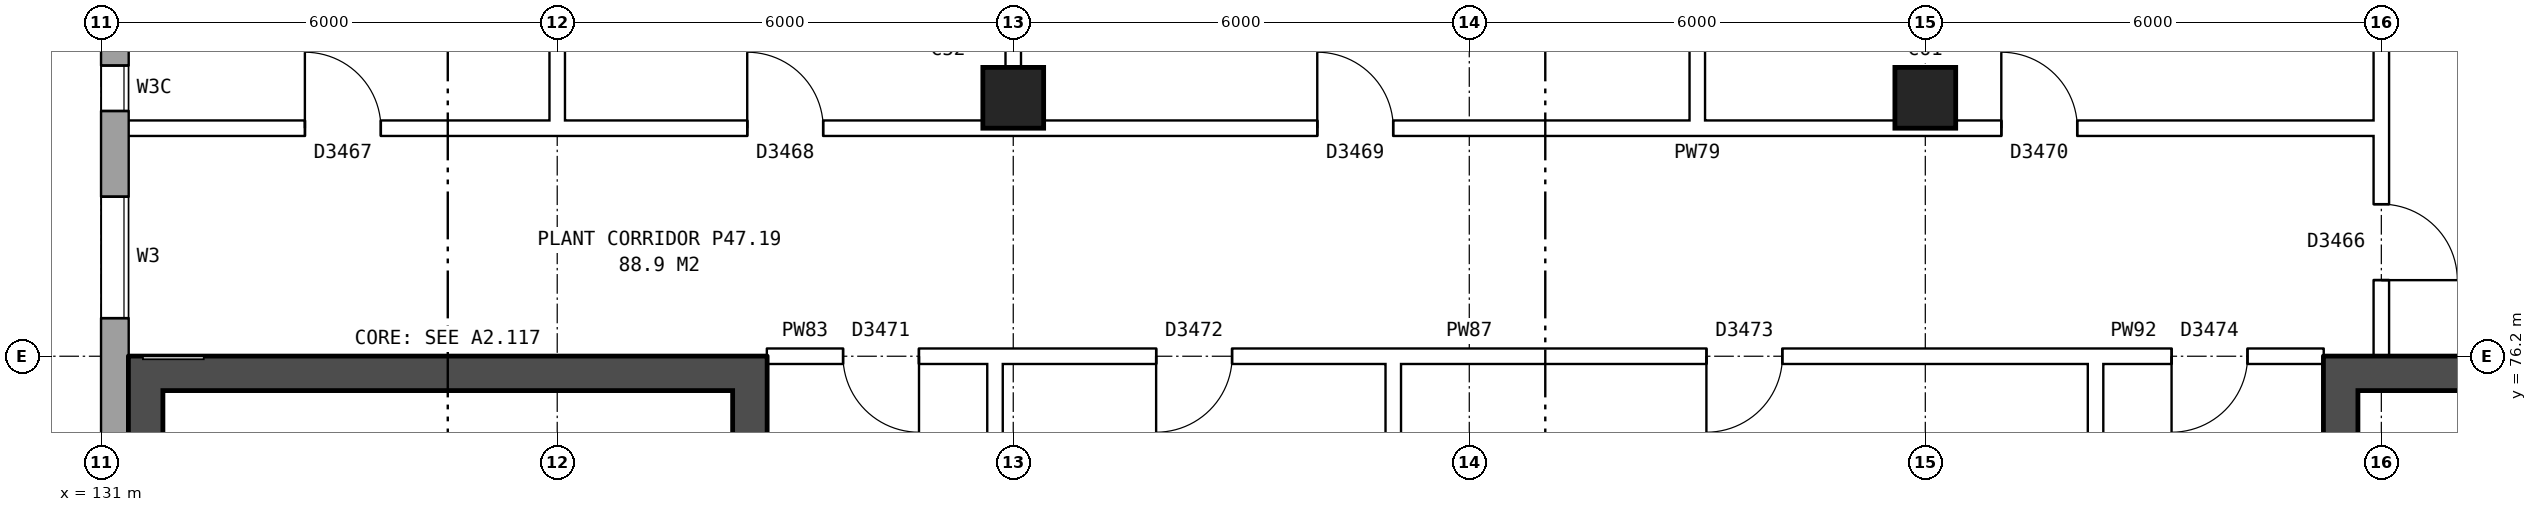
"""IFC4 building model, lengths in metres.
Left out: names, types, materials, properties, quantities, classifications, styles, units other than length and angle.
Written with IfcOpenShell. Run it as: python <this file> out.ifc"""

import sys

from ifc_helpers import new_model, si_unit, direction, frame, frame_2d, origin, origin_2d, place, context, subcontext, project, spatial, rectangle, extrude, element, fill, save


model = new_model("IFC4")
c1 = context("Model", 3, precision=1e-05, world=origin(), true_north=direction((0.0, 1.0)))
c2 = subcontext(c1, "Body", "Model", "MODEL_VIEW")
j1 = project(units=[si_unit("LENGTHUNIT", "METRE"), si_unit("PLANEANGLEUNIT", "RADIAN")], contexts=[c1])
p1 = place(None, origin())
s1 = spatial("IfcSite", under=j1, at=p1, CompositionType="ELEMENT")
p2 = place(p1, origin())
s2 = spatial("IfcBuilding", under=s1, at=p2, CompositionType="ELEMENT")
p3 = place(p2, frame((0.0, 0.0, 167.1)))
s3 = spatial("IfcBuildingStorey", under=s2, at=p3, CompositionType="ELEMENT", Elevation=167.1)
for number, where, z_axis, x_axis in (
    (1, (143.0, 79.6, 0.0), (0.0, 0.0, 1.0), (1.0, 0.0, 0.0)),
    (2, (155.0, 79.6, 0.0), (0.0, 0.0, 1.0), (1.0, 0.0, 0.0)),
):
    element("IfcColumn", number, at=place(p3, frame(where, z_axis=z_axis, x_axis=x_axis)), inside=s3, PredefinedType="COLUMN", context=c2, shape_type="SweptSolid", body=[
        extrude(rectangle(XDim=0.8, YDim=0.8, at=origin_2d()), origin(), (0.0, 0.0, 1.0), 4.2),
    ])
p4 = place(p3, frame((131.18, 82.925, 0.0), z_axis=(0.0, 0.0, 1.0), x_axis=(0.0, -1.0, 0.0)))
e3 = element("IfcWall", 3, at=p4, inside=s3, PredefinedType="STANDARD", context=c2, shape_type="SweptSolid", body=[
    extrude(rectangle(XDim=25.851, YDim=0.36, at=frame_2d((12.925, 0.0))), origin(), (0.0, 0.0, 1.0), 4.2),
])
p5 = place(p4, frame((2.9, 0.0, 1.5)))
e4 = element("IfcOpeningElement", 4, at=p5, cuts=e3, PredefinedType="OPENING", context=c2, shape_type="SweptSolid", body=[
    extrude(rectangle(XDim=0.6, YDim=1.2, at=frame_2d((0.3, 0.6))), frame((0.0, 0.19, 0.0), z_axis=(0.0, -1.0, 0.0), x_axis=(1.0, 0.0, 0.0)), (0.0, 0.0, 1.0), 0.38),
])
p6 = place(p4, frame((4.625, 0.0, 1.5)))
e5 = element("IfcOpeningElement", 5, at=p6, cuts=e3, PredefinedType="OPENING", context=c2, shape_type="SweptSolid", body=[
    extrude(rectangle(XDim=1.6, YDim=1.2, at=frame_2d((0.8, 0.6))), frame((0.0, 0.19, 0.0), z_axis=(0.0, -1.0, 0.0), x_axis=(1.0, 0.0, 0.0)), (0.0, 0.0, 1.0), 0.38),
])
p7 = place(p4, frame((21.1, 0.0, 1.5)))
e6 = element("IfcOpeningElement", 6, at=p7, cuts=e3, PredefinedType="OPENING", context=c2, shape_type="SweptSolid", body=[
    extrude(rectangle(XDim=0.6, YDim=1.2, at=frame_2d((0.3, 0.6))), frame((0.0, 0.19, 0.0), z_axis=(0.0, -1.0, 0.0), x_axis=(1.0, 0.0, 0.0)), (0.0, 0.0, 1.0), 0.38),
])
p8 = place(p4, frame((22.325, 0.0, 1.5)))
e7 = element("IfcOpeningElement", 7, at=p8, cuts=e3, PredefinedType="OPENING", context=c2, shape_type="SweptSolid", body=[
    extrude(rectangle(XDim=0.6, YDim=1.2, at=frame_2d((0.3, 0.6))), frame((0.0, 0.19, 0.0), z_axis=(0.0, -1.0, 0.0), x_axis=(1.0, 0.0, 0.0)), (0.0, 0.0, 1.0), 0.38),
])
p9 = place(p3, frame((139.535, 63.8, 0.0), z_axis=(0.0, 0.0, 1.0), x_axis=(0.0, 1.0, 0.0)))
e8 = element("IfcWall", 8, at=p9, inside=s3, PredefinedType="SHEAR", context=c2, shape_type="SweptSolid", body=[
    extrude(rectangle(XDim=12.4, YDim=0.45, at=frame_2d((6.2, 0.0))), origin(), (0.0, 0.0, 1.0), 4.2),
])
p10 = place(p9, frame((1.325, 0.0, 0.0)))
e9 = element("IfcOpeningElement", 9, at=p10, cuts=e8, PredefinedType="OPENING", context=c2, shape_type="SweptSolid", body=[
    extrude(rectangle(XDim=1.1, YDim=2.1, at=frame_2d((0.55, 1.05))), frame((0.0, 0.235, 0.0), z_axis=(0.0, -1.0, 0.0), x_axis=(1.0, 0.0, 0.0)), (0.0, 0.0, 1.0), 0.47),
])
p11 = place(p9, frame((3.6, 0.0, 0.0)))
e10 = element("IfcOpeningElement", 10, at=p11, cuts=e8, PredefinedType="OPENING", context=c2, shape_type="SweptSolid", body=[
    extrude(rectangle(XDim=1.1, YDim=2.1, at=frame_2d((0.55, 1.05))), frame((0.0, 0.235, 0.0), z_axis=(0.0, -1.0, 0.0), x_axis=(1.0, 0.0, 0.0)), (0.0, 0.0, 1.0), 0.47),
])
p12 = place(p9, frame((5.8, 0.0, 0.0)))
e11 = element("IfcOpeningElement", 11, at=p12, cuts=e8, PredefinedType="OPENING", context=c2, shape_type="SweptSolid", body=[
    extrude(rectangle(XDim=1.1, YDim=2.1, at=frame_2d((0.55, 1.05))), frame((0.0, 0.235, 0.0), z_axis=(0.0, -1.0, 0.0), x_axis=(1.0, 0.0, 0.0)), (0.0, 0.0, 1.0), 0.47),
])
p13 = place(p9, frame((9.9, 0.0, 0.0)))
e12 = element("IfcOpeningElement", 12, at=p13, cuts=e8, PredefinedType="OPENING", context=c2, shape_type="SweptSolid", body=[
    extrude(rectangle(XDim=1.1, YDim=2.1, at=frame_2d((0.55, 1.05))), frame((0.0, 0.235, 0.0), z_axis=(0.0, -1.0, 0.0), x_axis=(1.0, 0.0, 0.0)), (0.0, 0.0, 1.0), 0.47),
])
p14 = place(p9, frame((8.125, 0.0, 0.0)))
e13 = element("IfcOpeningElement", 13, at=p14, cuts=e8, PredefinedType="OPENING", context=c2, shape_type="SweptSolid", body=[
    extrude(rectangle(XDim=0.85, YDim=2.1, at=frame_2d((0.425, 1.05))), frame((0.0, 0.235, 0.0), z_axis=(0.0, -1.0, 0.0), x_axis=(1.0, 0.0, 0.0)), (0.0, 0.0, 1.0), 0.47),
])
p15 = place(p3, frame((131.585, 63.8, 0.0), z_axis=(0.0, 0.0, 1.0), x_axis=(0.0, 1.0, 0.0)))
e14 = element("IfcWall", 14, at=p15, inside=s3, PredefinedType="SHEAR", context=c2, shape_type="SweptSolid", body=[
    extrude(rectangle(XDim=12.4, YDim=0.45, at=frame_2d((6.2, 0.0))), origin(), (0.0, 0.0, 1.0), 4.2),
])
p16 = place(p3, frame((139.31, 75.975, 0.0), z_axis=(0.0, 0.0, 1.0), x_axis=(-1.0, 0.0, 0.0)))
e15 = element("IfcWall", 15, at=p16, inside=s3, PredefinedType="SHEAR", context=c2, shape_type="SweptSolid", body=[
    extrude(rectangle(XDim=7.5, YDim=0.45, at=frame_2d((3.75, 0.0))), origin(), (0.0, 0.0, 1.0), 4.2),
])
p17 = place(p3, frame((142.76, 63.9, 0.0), z_axis=(0.0, 0.0, 1.0), x_axis=(0.0, 1.0, 0.0)))
e16 = element("IfcWall", 16, at=p17, inside=s3, PredefinedType="PARTITIONING", context=c2, shape_type="SweptSolid", body=[
    extrude(rectangle(XDim=12.2, YDim=0.2, at=frame_2d((6.1, 0.0))), origin(), (0.0, 0.0, 1.0), 4.2),
])
p18 = place(p17, frame((5.1, 0.0, 0.0)))
e17 = element("IfcOpeningElement", 17, at=p18, cuts=e16, PredefinedType="OPENING", context=c2, shape_type="SweptSolid", body=[
    extrude(rectangle(XDim=2.0, YDim=2.1, at=frame_2d((1.0, 1.05))), frame((0.0, 0.11, 0.0), z_axis=(0.0, -1.0, 0.0), x_axis=(1.0, 0.0, 0.0)), (0.0, 0.0, 1.0), 0.22),
])
p19 = place(p3, frame((160.465, 76.2, 0.0), z_axis=(0.0, 0.0, 1.0), x_axis=(0.0, -1.0, 0.0)))
e18 = element("IfcWall", 18, at=p19, inside=s3, PredefinedType="SHEAR", context=c2, shape_type="SweptSolid", body=[
    extrude(rectangle(XDim=12.4, YDim=0.45, at=frame_2d((6.2, 0.0))), origin(), (0.0, 0.0, 1.0), 4.2),
])
p20 = place(p19, frame((1.325, 0.0, 0.0)))
e19 = element("IfcOpeningElement", 19, at=p20, cuts=e18, PredefinedType="OPENING", context=c2, shape_type="SweptSolid", body=[
    extrude(rectangle(XDim=1.1, YDim=2.1, at=frame_2d((0.55, 1.05))), frame((0.0, 0.235, 0.0), z_axis=(0.0, -1.0, 0.0), x_axis=(1.0, 0.0, 0.0)), (0.0, 0.0, 1.0), 0.47),
])
p21 = place(p19, frame((4.025, 0.0, 0.0)))
e20 = element("IfcOpeningElement", 20, at=p21, cuts=e18, PredefinedType="OPENING", context=c2, shape_type="SweptSolid", body=[
    extrude(rectangle(XDim=0.85, YDim=2.1, at=frame_2d((0.425, 1.05))), frame((0.0, 0.235, 0.0), z_axis=(0.0, -1.0, 0.0), x_axis=(1.0, 0.0, 0.0)), (0.0, 0.0, 1.0), 0.47),
])
p22 = place(p19, frame((6.175, 0.0, 0.0)))
e21 = element("IfcOpeningElement", 21, at=p22, cuts=e18, PredefinedType="OPENING", context=c2, shape_type="SweptSolid", body=[
    extrude(rectangle(XDim=0.85, YDim=2.1, at=frame_2d((0.425, 1.05))), frame((0.0, 0.235, 0.0), z_axis=(0.0, -1.0, 0.0), x_axis=(1.0, 0.0, 0.0)), (0.0, 0.0, 1.0), 0.47),
])
p23 = place(p19, frame((9.9, 0.0, 0.0)))
e22 = element("IfcOpeningElement", 22, at=p23, cuts=e18, PredefinedType="OPENING", context=c2, shape_type="SweptSolid", body=[
    extrude(rectangle(XDim=1.1, YDim=2.1, at=frame_2d((0.55, 1.05))), frame((0.0, 0.235, 0.0), z_axis=(0.0, -1.0, 0.0), x_axis=(1.0, 0.0, 0.0)), (0.0, 0.0, 1.0), 0.47),
])
p24 = place(p19, frame((8.125, 0.0, 0.0)))
e23 = element("IfcOpeningElement", 23, at=p24, cuts=e18, PredefinedType="OPENING", context=c2, shape_type="SweptSolid", body=[
    extrude(rectangle(XDim=0.85, YDim=2.1, at=frame_2d((0.425, 1.05))), frame((0.0, 0.235, 0.0), z_axis=(0.0, -1.0, 0.0), x_axis=(1.0, 0.0, 0.0)), (0.0, 0.0, 1.0), 0.47),
])
p25 = place(p3, frame((160.69, 75.975, 0.0), z_axis=(0.0, 0.0, 1.0), x_axis=(1.0, 0.0, 0.0)))
e24 = element("IfcWall", 24, at=p25, inside=s3, PredefinedType="SHEAR", context=c2, shape_type="SweptSolid", body=[
    extrude(rectangle(XDim=7.5, YDim=0.45, at=frame_2d((3.75, 0.0))), origin(), (0.0, 0.0, 1.0), 4.2),
])
p26 = place(p3, frame((157.24, 63.9, 0.0), z_axis=(0.0, 0.0, 1.0), x_axis=(0.0, 1.0, 0.0)))
e25 = element("IfcWall", 25, at=p26, inside=s3, PredefinedType="PARTITIONING", context=c2, shape_type="SweptSolid", body=[
    extrude(rectangle(XDim=12.2, YDim=0.2, at=frame_2d((6.1, 0.0))), origin(), (0.0, 0.0, 1.0), 4.2),
])
p27 = place(p26, frame((5.1, 0.0, 0.0)))
e26 = element("IfcOpeningElement", 26, at=p27, cuts=e25, PredefinedType="OPENING", context=c2, shape_type="SweptSolid", body=[
    extrude(rectangle(XDim=2.0, YDim=2.1, at=frame_2d((1.0, 1.05))), frame((0.0, 0.11, 0.0), z_axis=(0.0, -1.0, 0.0), x_axis=(1.0, 0.0, 0.0)), (0.0, 0.0, 1.0), 0.22),
])
p28 = place(p3, frame((142.76, 76.2, 0.0), z_axis=(0.0, 0.0, 1.0), x_axis=(1.0, 0.0, 0.0)))
e27 = element("IfcWall", 27, at=p28, inside=s3, PredefinedType="PARTITIONING", context=c2, shape_type="SweptSolid", body=[
    extrude(rectangle(XDim=14.48, YDim=0.2, at=frame_2d((7.24, 0.0))), origin(), (0.0, 0.0, 1.0), 4.2),
])
p29 = place(p28, frame((2.12, 0.0, 0.0)))
e28 = element("IfcOpeningElement", 28, at=p29, cuts=e27, PredefinedType="OPENING", context=c2, shape_type="SweptSolid", body=[
    extrude(rectangle(XDim=1.0, YDim=2.1, at=frame_2d((0.5, 1.05))), frame((0.0, 0.11, 0.0), z_axis=(0.0, -1.0, 0.0), x_axis=(1.0, 0.0, 0.0)), (0.0, 0.0, 1.0), 0.22),
])
p30 = place(p28, frame((9.36, 0.0, 0.0)))
e29 = element("IfcOpeningElement", 29, at=p30, cuts=e27, PredefinedType="OPENING", context=c2, shape_type="SweptSolid", body=[
    extrude(rectangle(XDim=1.0, YDim=2.1, at=frame_2d((0.5, 1.05))), frame((0.0, 0.11, 0.0), z_axis=(0.0, -1.0, 0.0), x_axis=(1.0, 0.0, 0.0)), (0.0, 0.0, 1.0), 0.22),
])
p31 = place(p3, frame((139.76, 76.2, 0.0), z_axis=(0.0, 0.0, 1.0), x_axis=(1.0, 0.0, 0.0)))
e30 = element("IfcWall", 30, at=p31, inside=s3, PredefinedType="PARTITIONING", context=c2, shape_type="SweptSolid", body=[
    extrude(rectangle(XDim=3.0, YDim=0.2, at=frame_2d((1.5, 0.0))), origin(), (0.0, 0.0, 1.0), 4.2),
])
p32 = place(p31, frame((1.0, 0.0, 0.0)))
e31 = element("IfcOpeningElement", 31, at=p32, cuts=e30, PredefinedType="OPENING", context=c2, shape_type="SweptSolid", body=[
    extrude(rectangle(XDim=1.0, YDim=2.1, at=frame_2d((0.5, 1.05))), frame((0.0, 0.11, 0.0), z_axis=(0.0, -1.0, 0.0), x_axis=(1.0, 0.0, 0.0)), (0.0, 0.0, 1.0), 0.22),
])
p33 = place(p3, frame((157.24, 76.2, 0.0), z_axis=(0.0, 0.0, 1.0), x_axis=(1.0, 0.0, 0.0)))
e32 = element("IfcWall", 32, at=p33, inside=s3, PredefinedType="PARTITIONING", context=c2, shape_type="SweptSolid", body=[
    extrude(rectangle(XDim=3.0, YDim=0.2, at=frame_2d((1.5, 0.0))), origin(), (0.0, 0.0, 1.0), 4.2),
])
p34 = place(p33, frame((1.0, 0.0, 0.0)))
e33 = element("IfcOpeningElement", 33, at=p34, cuts=e32, PredefinedType="OPENING", context=c2, shape_type="SweptSolid", body=[
    extrude(rectangle(XDim=1.0, YDim=2.1, at=frame_2d((0.5, 1.05))), frame((0.0, 0.11, 0.0), z_axis=(0.0, -1.0, 0.0), x_axis=(1.0, 0.0, 0.0)), (0.0, 0.0, 1.0), 0.22),
])
p35 = place(p3, frame((131.24, 79.2, 0.0), z_axis=(0.0, 0.0, 1.0), x_axis=(1.0, 0.0, 0.0)))
e34 = element("IfcWall", 34, at=p35, inside=s3, PredefinedType="PARTITIONING", context=c2, shape_type="SweptSolid", body=[
    extrude(rectangle(XDim=29.86, YDim=0.2, at=frame_2d((14.93, 0.0))), origin(), (0.0, 0.0, 1.0), 4.2),
])
p36 = place(p35, frame((2.44, 0.0, 0.0)))
e35 = element("IfcOpeningElement", 35, at=p36, cuts=e34, PredefinedType="OPENING", context=c2, shape_type="SweptSolid", body=[
    extrude(rectangle(XDim=1.0, YDim=2.1, at=frame_2d((0.5, 1.05))), frame((0.0, 0.11, 0.0), z_axis=(0.0, -1.0, 0.0), x_axis=(1.0, 0.0, 0.0)), (0.0, 0.0, 1.0), 0.22),
])
p37 = place(p35, frame((8.26, 0.0, 0.0)))
e36 = element("IfcOpeningElement", 36, at=p37, cuts=e34, PredefinedType="OPENING", context=c2, shape_type="SweptSolid", body=[
    extrude(rectangle(XDim=1.0, YDim=2.1, at=frame_2d((0.5, 1.05))), frame((0.0, 0.11, 0.0), z_axis=(0.0, -1.0, 0.0), x_axis=(1.0, 0.0, 0.0)), (0.0, 0.0, 1.0), 0.22),
])
p38 = place(p35, frame((15.76, 0.0, 0.0)))
e37 = element("IfcOpeningElement", 37, at=p38, cuts=e34, PredefinedType="OPENING", context=c2, shape_type="SweptSolid", body=[
    extrude(rectangle(XDim=1.0, YDim=2.1, at=frame_2d((0.5, 1.05))), frame((0.0, 0.11, 0.0), z_axis=(0.0, -1.0, 0.0), x_axis=(1.0, 0.0, 0.0)), (0.0, 0.0, 1.0), 0.22),
])
p39 = place(p35, frame((24.76, 0.0, 0.0)))
e38 = element("IfcOpeningElement", 38, at=p39, cuts=e34, PredefinedType="OPENING", context=c2, shape_type="SweptSolid", body=[
    extrude(rectangle(XDim=1.0, YDim=2.1, at=frame_2d((0.5, 1.05))), frame((0.0, 0.11, 0.0), z_axis=(0.0, -1.0, 0.0), x_axis=(1.0, 0.0, 0.0)), (0.0, 0.0, 1.0), 0.22),
])
for number, where, z_axis, x_axis in (
    (39, (137.0, 79.1, 0.0), (0.0, 0.0, 1.0), (0.0, 1.0, 0.0)),
    (40, (143.0, 79.1, 0.0), (0.0, 0.0, 1.0), (0.0, 1.0, 0.0)),
):
    element("IfcWall", number, at=place(p3, frame(where, z_axis=z_axis, x_axis=x_axis)), inside=s3, PredefinedType="PARTITIONING", context=c2, shape_type="SweptSolid", body=[
        extrude(rectangle(XDim=6.66, YDim=0.2, at=frame_2d((3.33, 0.0))), origin(), (0.0, 0.0, 1.0), 4.2),
    ])
p40 = place(p3, frame((148.0, 71.1, 0.0), z_axis=(0.0, 0.0, 1.0), x_axis=(0.0, 1.0, 0.0)))
e41 = element("IfcWall", 41, at=p40, inside=s3, PredefinedType="PARTITIONING", context=c2, shape_type="SweptSolid", body=[
    extrude(rectangle(XDim=5.2, YDim=0.2, at=frame_2d((2.6, 0.0))), origin(), (0.0, 0.0, 1.0), 4.2),
])
p41 = place(p3, frame((152.0, 79.1, 0.0), z_axis=(0.0, 0.0, 1.0), x_axis=(0.0, 1.0, 0.0)))
e42 = element("IfcWall", 42, at=p41, inside=s3, PredefinedType="PARTITIONING", context=c2, shape_type="SweptSolid", body=[
    extrude(rectangle(XDim=6.66, YDim=0.2, at=frame_2d((3.33, 0.0))), origin(), (0.0, 0.0, 1.0), 4.2),
])
p42 = place(p3, frame((161.0, 76.2, 0.0), z_axis=(0.0, 0.0, 1.0), x_axis=(0.0, 1.0, 0.0)))
e43 = element("IfcWall", 43, at=p42, inside=s3, PredefinedType="PARTITIONING", context=c2, shape_type="SweptSolid", body=[
    extrude(rectangle(XDim=9.56, YDim=0.2, at=frame_2d((4.78, 0.0))), origin(), (0.0, 0.0, 1.0), 4.2),
])
p43 = place(p42, frame((1.001, 0.0, 0.0)))
e44 = element("IfcOpeningElement", 44, at=p43, cuts=e43, PredefinedType="OPENING", context=c2, shape_type="SweptSolid", body=[
    extrude(rectangle(XDim=1.0, YDim=2.1, at=frame_2d((0.5, 1.05))), frame((0.0, 0.11, 0.0), z_axis=(0.0, -1.0, 0.0), x_axis=(1.0, 0.0, 0.0)), (0.0, 0.0, 1.0), 0.22),
])
p44 = place(p5, origin())
e45 = element("IfcWindow", 45, at=p44, inside=s3, PartitioningType="DOUBLE_PANEL_HORIZONTAL", PredefinedType="WINDOW", context=c2, shape_type="SweptSolid", body=[
    extrude(rectangle(XDim=0.6, YDim=1.2, at=frame_2d((0.3, 0.6))), frame((0.0, 0.15, 0.0), z_axis=(0.0, -1.0, 0.0), x_axis=(1.0, 0.0, 0.0)), (0.0, 0.0, 1.0), 0.06),
])
fill(e4, e45)
p45 = place(p6, origin())
e46 = element("IfcWindow", 46, at=p45, inside=s3, PartitioningType="DOUBLE_PANEL_HORIZONTAL", PredefinedType="WINDOW", context=c2, shape_type="SweptSolid", body=[
    extrude(rectangle(XDim=1.6, YDim=1.2, at=frame_2d((0.8, 0.6))), frame((0.0, 0.15, 0.0), z_axis=(0.0, -1.0, 0.0), x_axis=(1.0, 0.0, 0.0)), (0.0, 0.0, 1.0), 0.06),
])
fill(e5, e46)
p46 = place(p29, frame((1.0, 0.0, 0.0), z_axis=(0.0, 0.0, 1.0), x_axis=(-1.0, 0.0, 0.0)))
e47 = element("IfcDoor", 47, at=p46, inside=s3, OperationType="SINGLE_SWING_RIGHT", PredefinedType="DOOR", context=c2, shape_type="SweptSolid", body=[
    extrude(rectangle(XDim=1.0, YDim=2.1, at=frame_2d((0.5, 1.05))), frame((0.0, 0.025, 0.0), z_axis=(0.0, -1.0, 0.0), x_axis=(1.0, 0.0, 0.0)), (0.0, 0.0, 1.0), 0.05),
])
fill(e28, e47)
p47 = place(p30, frame((1.0, 0.0, 0.0), z_axis=(0.0, 0.0, 1.0), x_axis=(-1.0, 0.0, 0.0)))
e48 = element("IfcDoor", 48, at=p47, inside=s3, OperationType="SINGLE_SWING_RIGHT", PredefinedType="DOOR", context=c2, shape_type="SweptSolid", body=[
    extrude(rectangle(XDim=1.0, YDim=2.1, at=frame_2d((0.5, 1.05))), frame((0.0, 0.025, 0.0), z_axis=(0.0, -1.0, 0.0), x_axis=(1.0, 0.0, 0.0)), (0.0, 0.0, 1.0), 0.05),
])
fill(e29, e48)
p48 = place(p32, frame((1.0, 0.0, 0.0), z_axis=(0.0, 0.0, 1.0), x_axis=(-1.0, 0.0, 0.0)))
e49 = element("IfcDoor", 49, at=p48, inside=s3, OperationType="SINGLE_SWING_LEFT", PredefinedType="DOOR", context=c2, shape_type="SweptSolid", body=[
    extrude(rectangle(XDim=1.0, YDim=2.1, at=frame_2d((0.5, 1.05))), frame((0.0, 0.025, 0.0), z_axis=(0.0, -1.0, 0.0), x_axis=(1.0, 0.0, 0.0)), (0.0, 0.0, 1.0), 0.05),
])
fill(e31, e49)
p49 = place(p34, frame((1.0, 0.0, 0.0), z_axis=(0.0, 0.0, 1.0), x_axis=(-1.0, 0.0, 0.0)))
e50 = element("IfcDoor", 50, at=p49, inside=s3, OperationType="SINGLE_SWING_RIGHT", PredefinedType="DOOR", context=c2, shape_type="SweptSolid", body=[
    extrude(rectangle(XDim=1.0, YDim=2.1, at=frame_2d((0.5, 1.05))), frame((0.0, 0.025, 0.0), z_axis=(0.0, -1.0, 0.0), x_axis=(1.0, 0.0, 0.0)), (0.0, 0.0, 1.0), 0.05),
])
fill(e33, e50)
p50 = place(p36, origin())
e51 = element("IfcDoor", 51, at=p50, inside=s3, OperationType="SINGLE_SWING_LEFT", PredefinedType="DOOR", context=c2, shape_type="SweptSolid", body=[
    extrude(rectangle(XDim=1.0, YDim=2.1, at=frame_2d((0.5, 1.05))), frame((0.0, 0.025, 0.0), z_axis=(0.0, -1.0, 0.0), x_axis=(1.0, 0.0, 0.0)), (0.0, 0.0, 1.0), 0.05),
])
fill(e35, e51)
p51 = place(p37, origin())
e52 = element("IfcDoor", 52, at=p51, inside=s3, OperationType="SINGLE_SWING_LEFT", PredefinedType="DOOR", context=c2, shape_type="SweptSolid", body=[
    extrude(rectangle(XDim=1.0, YDim=2.1, at=frame_2d((0.5, 1.05))), frame((0.0, 0.025, 0.0), z_axis=(0.0, -1.0, 0.0), x_axis=(1.0, 0.0, 0.0)), (0.0, 0.0, 1.0), 0.05),
])
fill(e36, e52)
p52 = place(p38, origin())
e53 = element("IfcDoor", 53, at=p52, inside=s3, OperationType="SINGLE_SWING_LEFT", PredefinedType="DOOR", context=c2, shape_type="SweptSolid", body=[
    extrude(rectangle(XDim=1.0, YDim=2.1, at=frame_2d((0.5, 1.05))), frame((0.0, 0.025, 0.0), z_axis=(0.0, -1.0, 0.0), x_axis=(1.0, 0.0, 0.0)), (0.0, 0.0, 1.0), 0.05),
])
fill(e37, e53)
p53 = place(p39, origin())
e54 = element("IfcDoor", 54, at=p53, inside=s3, OperationType="SINGLE_SWING_LEFT", PredefinedType="DOOR", context=c2, shape_type="SweptSolid", body=[
    extrude(rectangle(XDim=1.0, YDim=2.1, at=frame_2d((0.5, 1.05))), frame((0.0, 0.025, 0.0), z_axis=(0.0, -1.0, 0.0), x_axis=(1.0, 0.0, 0.0)), (0.0, 0.0, 1.0), 0.05),
])
fill(e38, e54)
p54 = place(p43, frame((1.0, 0.0, 0.0), z_axis=(0.0, 0.0, 1.0), x_axis=(-1.0, 0.0, 0.0)))
e55 = element("IfcDoor", 55, at=p54, inside=s3, OperationType="SINGLE_SWING_RIGHT", PredefinedType="DOOR", context=c2, shape_type="SweptSolid", body=[
    extrude(rectangle(XDim=1.0, YDim=2.1, at=frame_2d((0.5, 1.05))), frame((0.0, 0.025, 0.0), z_axis=(0.0, -1.0, 0.0), x_axis=(1.0, 0.0, 0.0)), (0.0, 0.0, 1.0), 0.05),
])
fill(e44, e55)
save(model, sys.argv[1])
